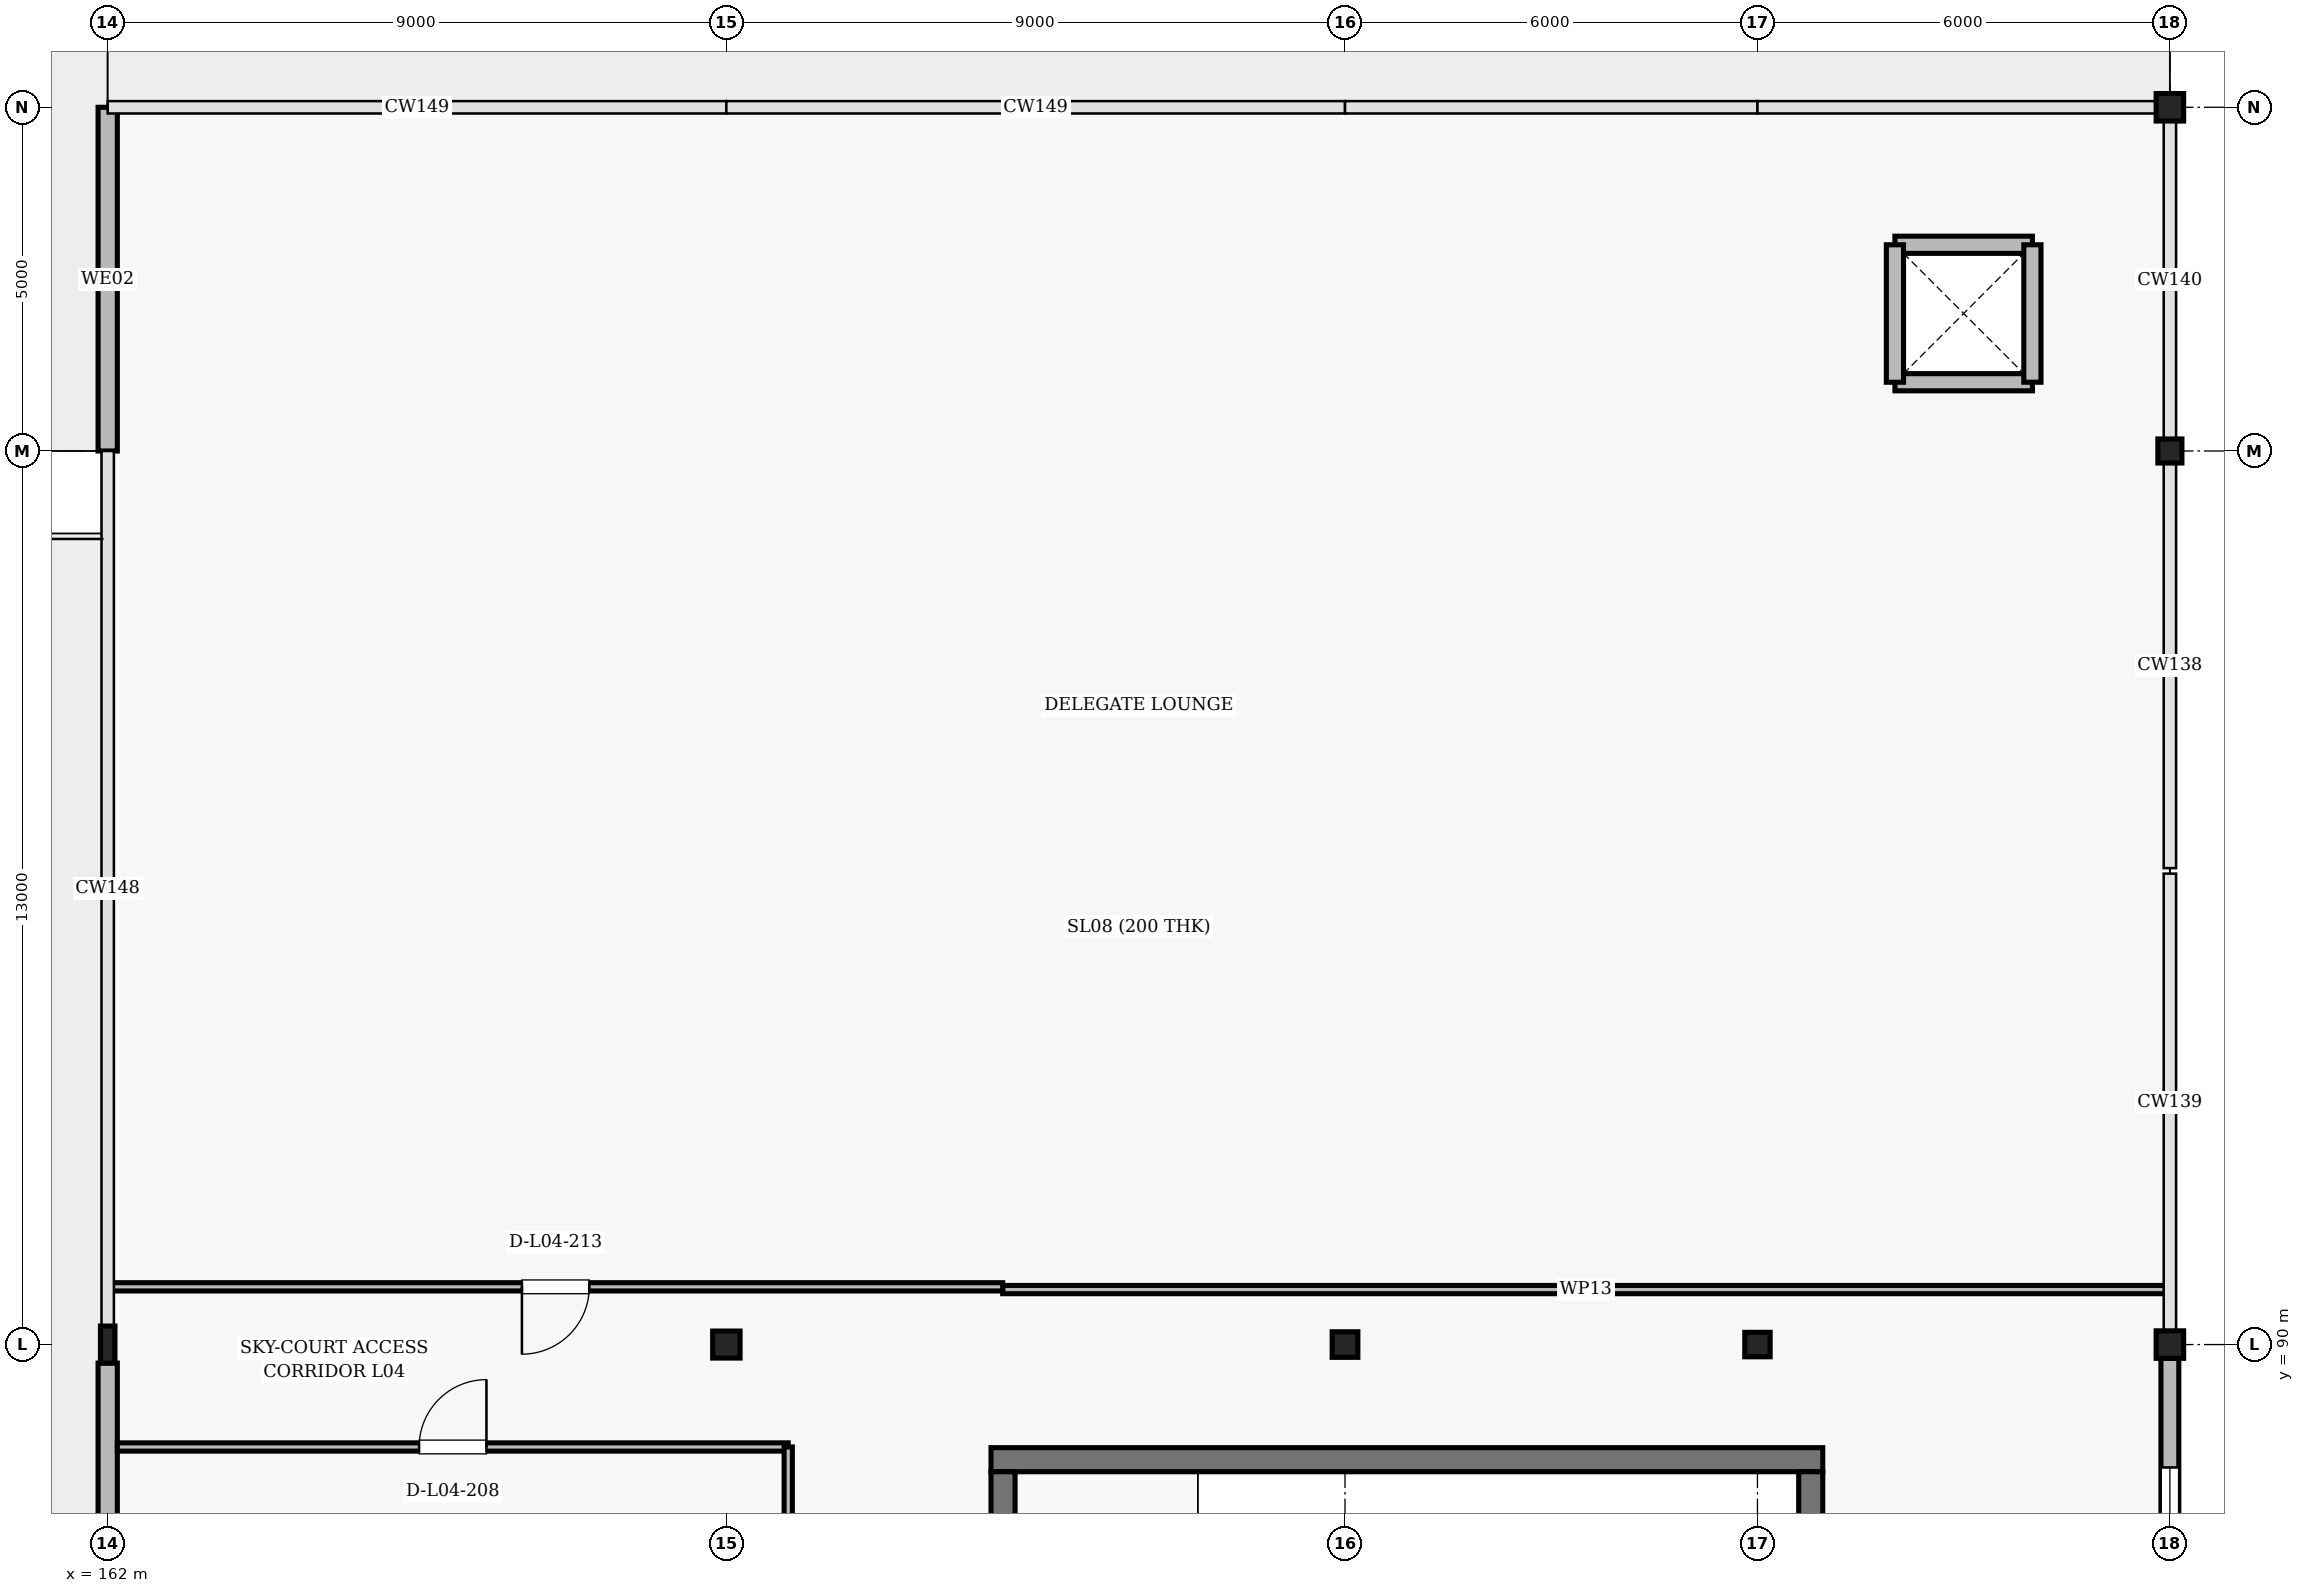
"""IFC4 building model, lengths in metres.
Left out: names, types, materials, properties, quantities, classifications, styles, units other than length and angle.
Written with IfcOpenShell. Run it as: python <this file> out.ifc"""

import sys

from ifc_helpers import new_model, si_unit, direction, frame, frame_2d, origin, origin_2d, place, context, subcontext, project, spatial, rectangle, hollow_rectangle, i_section, extrude, element, fill, save


model = new_model("IFC4")
c1 = context("Model", 3, precision=1e-05, world=origin(), true_north=direction((0.0, 1.0)))
c2 = subcontext(c1, "Body", "Model", "MODEL_VIEW")
j1 = project(units=[si_unit("LENGTHUNIT", "METRE"), si_unit("PLANEANGLEUNIT", "RADIAN")], contexts=[c1])
p1 = place(None, origin())
s1 = spatial("IfcSite", under=j1, at=p1, CompositionType="ELEMENT")
p2 = place(p1, origin())
s2 = spatial("IfcBuilding", under=s1, at=p2, CompositionType="ELEMENT")
p3 = place(p2, frame((0.0, 0.0, 20.4)))
s3 = spatial("IfcBuildingStorey", under=s2, at=p3, CompositionType="ELEMENT", Elevation=20.4)
p4 = place(p3, frame((162.0, 90.0, 0.0), z_axis=(0.0, 0.0, 1.0), x_axis=(1.0, 0.0, 0.0)))
e1 = element("IfcColumn", 1, at=p4, inside=s3, PredefinedType="COLUMN", context=c2, shape_type="SweptSolid", body=[
    extrude(i_section(OverallWidth=0.211, OverallDepth=0.539, WebThickness=0.012, FlangeThickness=0.019, FilletRadius=0.014, at=origin_2d()), origin(), (0.0, 0.0, 1.0), 4.8),
])
p5 = place(p3, frame((171.0, 90.0, 0.0), z_axis=(0.0, 0.0, 1.0), x_axis=(1.0, 0.0, 0.0)))
e2 = element("IfcColumn", 2, at=p5, inside=s3, PredefinedType="COLUMN", context=c2, shape_type="SweptSolid", body=[
    extrude(i_section(OverallWidth=0.399, OverallDepth=0.393, WebThickness=0.023, FlangeThickness=0.037, FilletRadius=0.018, at=origin_2d()), origin(), (0.0, 0.0, 1.0), 4.8),
])
p6 = place(p3, frame((180.0, 90.0, 0.0), z_axis=(0.0, 0.0, 1.0), x_axis=(1.0, 0.0, 0.0)))
e3 = element("IfcColumn", 3, at=p6, inside=s3, PredefinedType="COLUMN", context=c2, shape_type="SweptSolid", body=[
    extrude(i_section(OverallWidth=0.374, OverallDepth=0.372, WebThickness=0.016, FlangeThickness=0.026, FilletRadius=0.016, at=origin_2d()), origin(), (0.0, 0.0, 1.0), 4.8),
])
p7 = place(p3, frame((186.0, 90.0, 0.0), z_axis=(0.0, 0.0, 1.0), x_axis=(1.0, 0.0, 0.0)))
e4 = element("IfcColumn", 4, at=p7, inside=s3, PredefinedType="COLUMN", context=c2, shape_type="SweptSolid", body=[
    extrude(i_section(OverallWidth=0.369, OverallDepth=0.356, WebThickness=0.011, FlangeThickness=0.018, FilletRadius=0.015, at=origin_2d()), origin(), (0.0, 0.0, 1.0), 4.8),
])
p8 = place(p3, frame((192.0, 90.0, 0.0), z_axis=(0.0, 0.0, 1.0), x_axis=(1.0, 0.0, 0.0)))
e5 = element("IfcColumn", 5, at=p8, inside=s3, PredefinedType="COLUMN", context=c2, shape_type="SweptSolid", body=[
    extrude(hollow_rectangle(XDim=0.4, YDim=0.4, WallThickness=0.016, InnerFilletRadius=0.016, OuterFilletRadius=0.032, at=origin_2d()), origin(), (0.0, 0.0, 1.0), 4.8),
])
p9 = place(p3, frame((192.0, 103.0, 0.0), z_axis=(0.0, 0.0, 1.0), x_axis=(1.0, 0.0, 0.0)))
e6 = element("IfcColumn", 6, at=p9, inside=s3, PredefinedType="COLUMN", context=c2, shape_type="SweptSolid", body=[
    extrude(hollow_rectangle(XDim=0.35, YDim=0.35, WallThickness=0.012, InnerFilletRadius=0.012, OuterFilletRadius=0.025, at=origin_2d()), origin(), (0.0, 0.0, 1.0), 4.56),
])
p10 = place(p3, frame((192.0, 108.0, 0.0), z_axis=(0.0, 0.0, 1.0), x_axis=(1.0, 0.0, 0.0)))
e7 = element("IfcColumn", 7, at=p10, inside=s3, PredefinedType="COLUMN", context=c2, shape_type="SweptSolid", body=[
    extrude(hollow_rectangle(XDim=0.4, YDim=0.4, WallThickness=0.016, InnerFilletRadius=0.016, OuterFilletRadius=0.032, at=origin_2d()), origin(), (0.0, 0.0, 1.0), 4.56),
])
p11 = place(p3, frame((192.0, 89.8, 0.0), z_axis=(0.0, 0.0, 1.0), x_axis=(0.0, -1.0, 0.0)))
e8 = element("IfcWall", 8, at=p11, inside=s3, PredefinedType="SOLIDWALL", context=c2, shape_type="SweptSolid", body=[
    extrude(rectangle(XDim=8.25, YDim=0.26, at=frame_2d((4.125, 0.0))), origin(), (0.0, 0.0, 1.0), 4.245),
])
p12 = place(p11, frame((1.587, 0.0, 0.95)))
e9 = element("IfcOpeningElement", 9, at=p12, cuts=e8, PredefinedType="OPENING", context=c2, shape_type="SweptSolid", body=[
    extrude(rectangle(XDim=2.15, YDim=1.85, at=frame_2d((1.075, 0.925))), frame((0.0, 0.14, 0.0), z_axis=(0.0, -1.0, 0.0), x_axis=(1.0, 0.0, 0.0)), (0.0, 0.0, 1.0), 0.28),
])
p13 = place(p11, frame((4.438, 0.0, 0.95)))
e10 = element("IfcOpeningElement", 10, at=p13, cuts=e8, PredefinedType="OPENING", context=c2, shape_type="SweptSolid", body=[
    extrude(rectangle(XDim=2.3, YDim=1.9, at=frame_2d((1.15, 0.95))), frame((0.0, 0.14, 0.0), z_axis=(0.0, -1.0, 0.0), x_axis=(1.0, 0.0, 0.0)), (0.0, 0.0, 1.0), 0.28),
])
p14 = place(p3, frame((162.0, 81.178, 0.0), z_axis=(0.0, 0.0, 1.0), x_axis=(0.0, 1.0, 0.0)))
e11 = element("IfcWall", 11, at=p14, inside=s3, PredefinedType="SOLIDWALL", context=c2, shape_type="SweptSolid", body=[
    extrude(rectangle(XDim=8.552, YDim=0.28, at=frame_2d((4.276, 0.0))), origin(), (0.0, 0.0, 1.0), 3.85),
])
p15 = place(p14, frame((3.286, 0.0, 0.0)))
e12 = element("IfcOpeningElement", 12, at=p15, cuts=e11, PredefinedType="OPENING", context=c2, shape_type="SweptSolid", body=[
    extrude(rectangle(XDim=1.98, YDim=2.3, at=frame_2d((0.99, 1.15))), frame((0.0, 0.15, 0.0), z_axis=(0.0, -1.0, 0.0), x_axis=(1.0, 0.0, 0.0)), (0.0, 0.0, 1.0), 0.3),
])
p16 = place(p3, frame((162.0, 103.0, 0.0), z_axis=(0.0, 0.0, 1.0), x_axis=(0.0, 1.0, 0.0)))
e13 = element("IfcWall", 13, at=p16, inside=s3, PredefinedType="SOLIDWALL", context=c2, shape_type="SweptSolid", body=[
    extrude(rectangle(XDim=5.0, YDim=0.28, at=frame_2d((2.5, 0.0))), origin(), (0.0, 0.0, 1.0), 4.56),
])
p17 = place(p3, frame((186.95, 88.325, 0.0), z_axis=(0.0, 0.0, 1.0), x_axis=(-1.0, 0.0, 0.0)))
e14 = element("IfcWall", 14, at=p17, inside=s3, PredefinedType="SHEAR", context=c2, shape_type="SweptSolid", body=[
    extrude(rectangle(XDim=12.1, YDim=0.35, at=frame_2d((6.05, 0.0))), origin(), (0.0, 0.0, 1.0), 4.56),
])
p18 = place(p3, frame((175.025, 88.15, 0.0), z_axis=(0.0, 0.0, 1.0), x_axis=(0.0, -1.0, 0.0)))
e15 = element("IfcWall", 15, at=p18, inside=s3, PredefinedType="SHEAR", context=c2, shape_type="SweptSolid", body=[
    extrude(rectangle(XDim=5.5, YDim=0.35, at=frame_2d((2.75, 0.0))), origin(), (0.0, 0.0, 1.0), 4.56),
])
p19 = place(p18, frame((1.85, 0.0, 0.0)))
e16 = element("IfcOpeningElement", 16, at=p19, cuts=e15, PredefinedType="OPENING", context=c2, shape_type="SweptSolid", body=[
    extrude(rectangle(XDim=1.8, YDim=2.2, at=frame_2d((0.9, 1.1))), frame((0.0, 0.185, 0.0), z_axis=(0.0, -1.0, 0.0), x_axis=(1.0, 0.0, 0.0)), (0.0, 0.0, 1.0), 0.37),
])
p20 = place(p3, frame((186.775, 82.65, 0.0), z_axis=(0.0, 0.0, 1.0), x_axis=(0.0, 1.0, 0.0)))
e17 = element("IfcWall", 17, at=p20, inside=s3, PredefinedType="SHEAR", context=c2, shape_type="SweptSolid", body=[
    extrude(rectangle(XDim=5.5, YDim=0.35, at=frame_2d((2.75, 0.0))), origin(), (0.0, 0.0, 1.0), 4.56),
])
p21 = place(p3, frame((162.14, 88.51, 0.0), z_axis=(0.0, 0.0, 1.0), x_axis=(1.0, 0.0, 0.0)))
e18 = element("IfcWall", 18, at=p21, inside=s3, PredefinedType="PARTITIONING", context=c2, shape_type="SweptSolid", body=[
    extrude(rectangle(XDim=9.76, YDim=0.12, at=frame_2d((4.88, 0.0))), origin(), (0.0, 0.0, 1.0), 3.85),
])
p22 = place(p21, frame((4.39, 0.0, 0.0)))
e19 = element("IfcOpeningElement", 19, at=p22, cuts=e18, PredefinedType="OPENING", context=c2, shape_type="SweptSolid", body=[
    extrude(rectangle(XDim=0.98, YDim=2.15, at=frame_2d((0.49, 1.075))), frame((0.0, 0.07, 0.0), z_axis=(0.0, -1.0, 0.0), x_axis=(1.0, 0.0, 0.0)), (0.0, 0.0, 1.0), 0.14),
])
p23 = place(p3, frame((171.9, 88.51, 0.0), z_axis=(0.0, 0.0, 1.0), x_axis=(0.0, -1.0, 0.0)))
e20 = element("IfcWall", 20, at=p23, inside=s3, PredefinedType="PARTITIONING", context=c2, shape_type="SweptSolid", body=[
    extrude(rectangle(XDim=7.31, YDim=0.12, at=frame_2d((3.655, 0.0))), origin(), (0.0, 0.0, 1.0), 3.85),
])
p24 = place(p3, frame((191.988, 90.8, 0.0), z_axis=(0.0, 0.0, 1.0), x_axis=(-1.0, 0.0, 0.0)))
e21 = element("IfcWall", 21, at=p24, inside=s3, PredefinedType="PARTITIONING", context=c2, shape_type="SweptSolid", body=[
    extrude(rectangle(XDim=16.968, YDim=0.12, at=frame_2d((8.484, 0.0))), origin(), (0.0, 0.0, 1.0), 4.006),
])
p25 = place(p3, frame((175.02, 90.84, 0.0), z_axis=(0.0, 0.0, 1.0), x_axis=(-1.0, 0.0, 0.0)))
e22 = element("IfcWall", 22, at=p25, inside=s3, PredefinedType="PARTITIONING", context=c2, shape_type="SweptSolid", body=[
    extrude(rectangle(XDim=13.008, YDim=0.12, at=frame_2d((6.504, 0.0))), origin(), (0.0, 0.0, 1.0), 4.56),
])
p26 = place(p25, frame((6.014, 0.0, 0.0)))
e23 = element("IfcOpeningElement", 23, at=p26, cuts=e22, PredefinedType="OPENING", context=c2, shape_type="SweptSolid", body=[
    extrude(rectangle(XDim=0.98, YDim=2.15, at=frame_2d((0.49, 1.075))), frame((0.0, 0.07, 0.0), z_axis=(0.0, -1.0, 0.0), x_axis=(1.0, 0.0, 0.0)), (0.0, 0.0, 1.0), 0.14),
])
for number, where, z_axis, x_axis in (
    (24, (188.0, 104.0, 0.0), (0.0, 0.0, 1.0), (1.0, 0.0, 0.0)),
    (25, (190.0, 106.0, 0.0), (0.0, 0.0, 1.0), (-1.0, 0.0, 0.0)),
    (26, (188.0, 106.0, 0.0), (0.0, 0.0, 1.0), (0.0, -1.0, 0.0)),
    (27, (190.0, 104.0, 0.0), (0.0, 0.0, 1.0), (0.0, 1.0, 0.0)),
):
    element("IfcWall", number, at=place(p3, frame(where, z_axis=z_axis, x_axis=x_axis)), inside=s3, PredefinedType="SOLIDWALL", context=c2, shape_type="SweptSolid", body=[
        extrude(rectangle(XDim=2.0, YDim=0.25, at=frame_2d((1.0, 0.0))), origin(), (0.0, 0.0, 1.0), 4.21),
    ])
p27 = place(p12, origin())
e28 = element("IfcWindow", 28, at=p27, inside=s3, PartitioningType="SINGLE_PANEL", PredefinedType="WINDOW", context=c2, shape_type="SweptSolid", body=[
    extrude(rectangle(XDim=2.15, YDim=1.85, at=frame_2d((1.075, 0.925))), frame((0.0, 0.03, 0.0), z_axis=(0.0, -1.0, 0.0), x_axis=(1.0, 0.0, 0.0)), (0.0, 0.0, 1.0), 0.06),
])
fill(e9, e28)
p28 = place(p22, origin())
e29 = element("IfcDoor", 29, at=p28, inside=s3, OperationType="SINGLE_SWING_RIGHT", PredefinedType="DOOR", context=c2, shape_type="SweptSolid", body=[
    extrude(rectangle(XDim=0.98, YDim=2.15, at=frame_2d((0.49, 1.075))), frame((0.0, 0.025, 0.0), z_axis=(0.0, -1.0, 0.0), x_axis=(1.0, 0.0, 0.0)), (0.0, 0.0, 1.0), 0.05),
])
fill(e19, e29)
p29 = place(p26, origin())
e30 = element("IfcDoor", 30, at=p29, inside=s3, OperationType="SINGLE_SWING_RIGHT", PredefinedType="DOOR", context=c2, shape_type="SweptSolid", body=[
    extrude(rectangle(XDim=0.98, YDim=2.15, at=frame_2d((0.49, 1.075))), frame((0.0, 0.025, 0.0), z_axis=(0.0, -1.0, 0.0), x_axis=(1.0, 0.0, 0.0)), (0.0, 0.0, 1.0), 0.05),
])
fill(e23, e30)
save(model, sys.argv[1])
